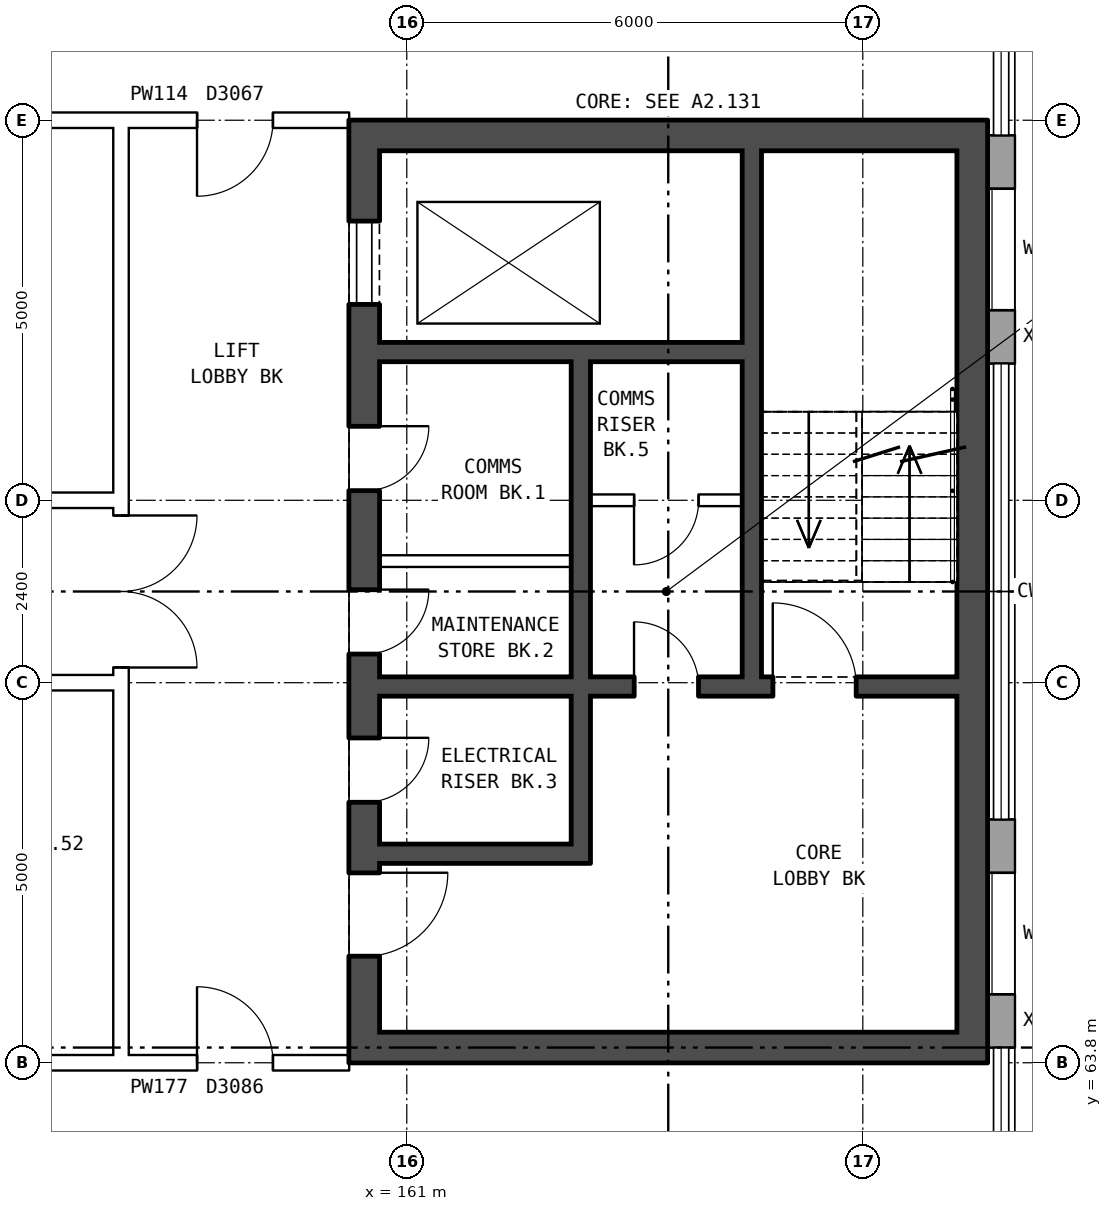
"""IFC4 building model, lengths in metres.
Left out: names, types, materials, properties, quantities, classifications, styles, units other than length and angle.
Written with IfcOpenShell. Run it as: python <this file> out.ifc"""

import sys

from ifc_helpers import new_model, si_unit, direction, frame, frame_2d, origin, place, context, subcontext, project, spatial, rectangle, extrude, element, fill, save


model = new_model("IFC4")
c1 = context("Model", 3, precision=1e-05, world=origin(), true_north=direction((0.0, 1.0)))
c2 = subcontext(c1, "Body", "Model", "MODEL_VIEW")
j1 = project(units=[si_unit("LENGTHUNIT", "METRE"), si_unit("PLANEANGLEUNIT", "RADIAN")], contexts=[c1])
p1 = place(None, origin())
s1 = spatial("IfcSite", under=j1, at=p1, CompositionType="ELEMENT")
p2 = place(p1, origin())
s2 = spatial("IfcBuilding", under=s1, at=p2, CompositionType="ELEMENT")
p3 = place(p2, frame((0.0, 0.0, 215.2)))
s3 = spatial("IfcBuildingStorey", under=s2, at=p3, CompositionType="ELEMENT", Elevation=215.2)
p4 = place(p3, frame((168.82, 64.0, 0.0), z_axis=(0.0, 0.0, 1.0), x_axis=(0.0, 1.0, 0.0)))
e1 = element("IfcWall", 1, at=p4, inside=s3, PredefinedType="STANDARD", context=c2, shape_type="SweptSolid", body=[
    extrude(rectangle(XDim=3.0, YDim=0.36, at=frame_2d((1.5, 0.0))), origin(), (0.0, 0.0, 1.0), 5.6),
])
p5 = place(p4, frame((0.7, 0.0, 3.4)))
e2 = element("IfcOpeningElement", 2, at=p5, cuts=e1, PredefinedType="OPENING", context=c2, shape_type="SweptSolid", body=[
    extrude(rectangle(XDim=1.6, YDim=1.2, at=frame_2d((0.8, 0.6))), frame((0.0, 0.19, 0.0), z_axis=(0.0, -1.0, 0.0), x_axis=(1.0, 0.0, 0.0)), (0.0, 0.0, 1.0), 0.38),
])
p6 = place(p3, frame((168.82, 73.0, 0.0), z_axis=(0.0, 0.0, 1.0), x_axis=(0.0, 1.0, 0.0)))
e3 = element("IfcWall", 3, at=p6, inside=s3, PredefinedType="STANDARD", context=c2, shape_type="SweptSolid", body=[
    extrude(rectangle(XDim=3.0, YDim=0.36, at=frame_2d((1.5, 0.0))), origin(), (0.0, 0.0, 1.0), 5.6),
])
p7 = place(p6, frame((0.7, 0.0, 3.4)))
e4 = element("IfcOpeningElement", 4, at=p7, cuts=e3, PredefinedType="OPENING", context=c2, shape_type="SweptSolid", body=[
    extrude(rectangle(XDim=1.6, YDim=1.2, at=frame_2d((0.8, 0.6))), frame((0.0, 0.19, 0.0), z_axis=(0.0, -1.0, 0.0), x_axis=(1.0, 0.0, 0.0)), (0.0, 0.0, 1.0), 0.38),
])
p8 = place(p3, frame((160.44, 76.2, 0.0), z_axis=(0.0, 0.0, 1.0), x_axis=(0.0, -1.0, 0.0)))
e5 = element("IfcWall", 5, at=p8, inside=s3, PredefinedType="SHEAR", context=c2, shape_type="SweptSolid", body=[
    extrude(rectangle(XDim=12.4, YDim=0.4, at=frame_2d((6.2, 0.0))), origin(), (0.0, 0.0, 1.0), 5.6),
])
p9 = place(p8, frame((1.325, 0.0, 0.0)))
e6 = element("IfcOpeningElement", 6, at=p9, cuts=e5, PredefinedType="OPENING", context=c2, shape_type="SweptSolid", body=[
    extrude(rectangle(XDim=1.1, YDim=2.1, at=frame_2d((0.55, 1.05))), frame((0.0, 0.21, 0.0), z_axis=(0.0, -1.0, 0.0), x_axis=(1.0, 0.0, 0.0)), (0.0, 0.0, 1.0), 0.42),
])
p10 = place(p8, frame((4.025, 0.0, 0.0)))
e7 = element("IfcOpeningElement", 7, at=p10, cuts=e5, PredefinedType="OPENING", context=c2, shape_type="SweptSolid", body=[
    extrude(rectangle(XDim=0.85, YDim=2.1, at=frame_2d((0.425, 1.05))), frame((0.0, 0.21, 0.0), z_axis=(0.0, -1.0, 0.0), x_axis=(1.0, 0.0, 0.0)), (0.0, 0.0, 1.0), 0.42),
])
p11 = place(p8, frame((6.175, 0.0, 0.0)))
e8 = element("IfcOpeningElement", 8, at=p11, cuts=e5, PredefinedType="OPENING", context=c2, shape_type="SweptSolid", body=[
    extrude(rectangle(XDim=0.85, YDim=2.1, at=frame_2d((0.425, 1.05))), frame((0.0, 0.21, 0.0), z_axis=(0.0, -1.0, 0.0), x_axis=(1.0, 0.0, 0.0)), (0.0, 0.0, 1.0), 0.42),
])
p12 = place(p8, frame((9.9, 0.0, 0.0)))
e9 = element("IfcOpeningElement", 9, at=p12, cuts=e5, PredefinedType="OPENING", context=c2, shape_type="SweptSolid", body=[
    extrude(rectangle(XDim=1.1, YDim=2.1, at=frame_2d((0.55, 1.05))), frame((0.0, 0.21, 0.0), z_axis=(0.0, -1.0, 0.0), x_axis=(1.0, 0.0, 0.0)), (0.0, 0.0, 1.0), 0.42),
])
p13 = place(p8, frame((8.125, 0.0, 0.0)))
e10 = element("IfcOpeningElement", 10, at=p13, cuts=e5, PredefinedType="OPENING", context=c2, shape_type="SweptSolid", body=[
    extrude(rectangle(XDim=0.85, YDim=2.1, at=frame_2d((0.425, 1.05))), frame((0.0, 0.21, 0.0), z_axis=(0.0, -1.0, 0.0), x_axis=(1.0, 0.0, 0.0)), (0.0, 0.0, 1.0), 0.42),
])
p14 = place(p3, frame((168.44, 76.2, 0.0), z_axis=(0.0, 0.0, 1.0), x_axis=(0.0, -1.0, 0.0)))
e11 = element("IfcWall", 11, at=p14, inside=s3, PredefinedType="SHEAR", context=c2, shape_type="SweptSolid", body=[
    extrude(rectangle(XDim=12.4, YDim=0.4, at=frame_2d((6.2, 0.0))), origin(), (0.0, 0.0, 1.0), 5.6),
])
for number, where, z_axis, x_axis in (
    (12, (160.64, 76.0, 0.0), (0.0, 0.0, 1.0), (1.0, 0.0, 0.0)),
    (13, (160.64, 64.0, 0.0), (0.0, 0.0, 1.0), (1.0, 0.0, 0.0)),
):
    element("IfcWall", number, at=place(p3, frame(where, z_axis=z_axis, x_axis=x_axis)), inside=s3, PredefinedType="SHEAR", context=c2, shape_type="SweptSolid", body=[
        extrude(rectangle(XDim=7.6, YDim=0.4, at=frame_2d((3.8, 0.0))), origin(), (0.0, 0.0, 1.0), 5.6),
    ])
p15 = place(p3, frame((160.64, 73.15, 0.0), z_axis=(0.0, 0.0, 1.0), x_axis=(1.0, 0.0, 0.0)))
e14 = element("IfcWall", 14, at=p15, inside=s3, PredefinedType="SHEAR", context=c2, shape_type="SweptSolid", body=[
    extrude(rectangle(XDim=4.775, YDim=0.25, at=frame_2d((2.388, 0.0))), origin(), (0.0, 0.0, 1.0), 5.6),
])
p16 = place(p3, frame((163.415, 71.2, 0.0), z_axis=(0.0, 0.0, 1.0), x_axis=(1.0, 0.0, 0.0)))
e15 = element("IfcWall", 15, at=p16, inside=s3, PredefinedType="PARTITIONING", context=c2, shape_type="SweptSolid", body=[
    extrude(rectangle(XDim=2.0, YDim=0.15, at=frame_2d((1.0, 0.0))), origin(), (0.0, 0.0, 1.0), 5.6),
])
p17 = place(p16, frame((0.575, 0.0, 0.0)))
e16 = element("IfcOpeningElement", 16, at=p17, cuts=e15, PredefinedType="OPENING", context=c2, shape_type="SweptSolid", body=[
    extrude(rectangle(XDim=0.85, YDim=2.1, at=frame_2d((0.425, 1.05))), frame((0.0, 0.085, 0.0), z_axis=(0.0, -1.0, 0.0), x_axis=(1.0, 0.0, 0.0)), (0.0, 0.0, 1.0), 0.17),
])
p18 = place(p3, frame((160.64, 70.4, 0.0), z_axis=(0.0, 0.0, 1.0), x_axis=(1.0, 0.0, 0.0)))
e17 = element("IfcWall", 17, at=p18, inside=s3, PredefinedType="PARTITIONING", context=c2, shape_type="SweptSolid", body=[
    extrude(rectangle(XDim=2.525, YDim=0.15, at=frame_2d((1.263, 0.0))), origin(), (0.0, 0.0, 1.0), 5.6),
])
p19 = place(p3, frame((160.64, 68.75, 0.0), z_axis=(0.0, 0.0, 1.0), x_axis=(1.0, 0.0, 0.0)))
e18 = element("IfcWall", 18, at=p19, inside=s3, PredefinedType="SHEAR", context=c2, shape_type="SweptSolid", body=[
    extrude(rectangle(XDim=7.6, YDim=0.25, at=frame_2d((3.8, 0.0))), origin(), (0.0, 0.0, 1.0), 5.6),
])
p20 = place(p19, frame((5.175, 0.0, 0.0)))
e19 = element("IfcOpeningElement", 19, at=p20, cuts=e18, PredefinedType="OPENING", context=c2, shape_type="SweptSolid", body=[
    extrude(rectangle(XDim=1.1, YDim=2.1, at=frame_2d((0.55, 1.05))), frame((0.0, 0.135, 0.0), z_axis=(0.0, -1.0, 0.0), x_axis=(1.0, 0.0, 0.0)), (0.0, 0.0, 1.0), 0.27),
])
p21 = place(p19, frame((3.35, 0.0, 0.0)))
e20 = element("IfcOpeningElement", 20, at=p21, cuts=e18, PredefinedType="OPENING", context=c2, shape_type="SweptSolid", body=[
    extrude(rectangle(XDim=0.85, YDim=2.1, at=frame_2d((0.425, 1.05))), frame((0.0, 0.135, 0.0), z_axis=(0.0, -1.0, 0.0), x_axis=(1.0, 0.0, 0.0)), (0.0, 0.0, 1.0), 0.27),
])
p22 = place(p3, frame((160.64, 66.55, 0.0), z_axis=(0.0, 0.0, 1.0), x_axis=(1.0, 0.0, 0.0)))
e21 = element("IfcWall", 21, at=p22, inside=s3, PredefinedType="SHEAR", context=c2, shape_type="SweptSolid", body=[
    extrude(rectangle(XDim=2.525, YDim=0.25, at=frame_2d((1.263, 0.0))), origin(), (0.0, 0.0, 1.0), 5.6),
])
p23 = place(p3, frame((163.29, 73.025, 0.0), z_axis=(0.0, 0.0, 1.0), x_axis=(0.0, -1.0, 0.0)))
e22 = element("IfcWall", 22, at=p23, inside=s3, PredefinedType="SHEAR", context=c2, shape_type="SweptSolid", body=[
    extrude(rectangle(XDim=4.15, YDim=0.25, at=frame_2d((2.075, 0.0))), origin(), (0.0, 0.0, 1.0), 5.6),
])
p24 = place(p3, frame((163.29, 68.625, 0.0), z_axis=(0.0, 0.0, 1.0), x_axis=(0.0, -1.0, 0.0)))
e23 = element("IfcWall", 23, at=p24, inside=s3, PredefinedType="SHEAR", context=c2, shape_type="SweptSolid", body=[
    extrude(rectangle(XDim=2.2, YDim=0.25, at=frame_2d((1.1, 0.0))), origin(), (0.0, 0.0, 1.0), 5.6),
])
p25 = place(p3, frame((165.54, 75.8, 0.0), z_axis=(0.0, 0.0, 1.0), x_axis=(0.0, -1.0, 0.0)))
e24 = element("IfcWall", 24, at=p25, inside=s3, PredefinedType="SHEAR", context=c2, shape_type="SweptSolid", body=[
    extrude(rectangle(XDim=6.925, YDim=0.25, at=frame_2d((3.462, 0.0))), origin(), (0.0, 0.0, 1.0), 5.6),
])
p26 = place(p3, frame((157.24, 63.9, 0.0), z_axis=(0.0, 0.0, 1.0), x_axis=(0.0, 1.0, 0.0)))
e25 = element("IfcWall", 25, at=p26, inside=s3, PredefinedType="PARTITIONING", context=c2, shape_type="SweptSolid", body=[
    extrude(rectangle(XDim=12.2, YDim=0.2, at=frame_2d((6.1, 0.0))), origin(), (0.0, 0.0, 1.0), 5.6),
])
p27 = place(p26, frame((5.1, 0.0, 0.0)))
e26 = element("IfcOpeningElement", 26, at=p27, cuts=e25, PredefinedType="OPENING", context=c2, shape_type="SweptSolid", body=[
    extrude(rectangle(XDim=2.0, YDim=2.1, at=frame_2d((1.0, 1.05))), frame((0.0, 0.11, 0.0), z_axis=(0.0, -1.0, 0.0), x_axis=(1.0, 0.0, 0.0)), (0.0, 0.0, 1.0), 0.22),
])
p28 = place(p3, frame((142.76, 63.8, 0.0), z_axis=(0.0, 0.0, 1.0), x_axis=(1.0, 0.0, 0.0)))
e27 = element("IfcWall", 27, at=p28, inside=s3, PredefinedType="PARTITIONING", context=c2, shape_type="SweptSolid", body=[
    extrude(rectangle(XDim=14.48, YDim=0.2, at=frame_2d((7.24, 0.0))), origin(), (0.0, 0.0, 1.0), 5.6),
])
p29 = place(p28, frame((3.12, 0.0, 0.0)))
e28 = element("IfcOpeningElement", 28, at=p29, cuts=e27, PredefinedType="OPENING", context=c2, shape_type="SweptSolid", body=[
    extrude(rectangle(XDim=1.0, YDim=2.1, at=frame_2d((0.5, 1.05))), frame((0.0, 0.11, 0.0), z_axis=(0.0, -1.0, 0.0), x_axis=(1.0, 0.0, 0.0)), (0.0, 0.0, 1.0), 0.22),
])
p30 = place(p28, frame((10.36, 0.0, 0.0)))
e29 = element("IfcOpeningElement", 29, at=p30, cuts=e27, PredefinedType="OPENING", context=c2, shape_type="SweptSolid", body=[
    extrude(rectangle(XDim=1.0, YDim=2.1, at=frame_2d((0.5, 1.05))), frame((0.0, 0.11, 0.0), z_axis=(0.0, -1.0, 0.0), x_axis=(1.0, 0.0, 0.0)), (0.0, 0.0, 1.0), 0.22),
])
p31 = place(p3, frame((157.24, 63.8, 0.0), z_axis=(0.0, 0.0, 1.0), x_axis=(1.0, 0.0, 0.0)))
e30 = element("IfcWall", 30, at=p31, inside=s3, PredefinedType="PARTITIONING", context=c2, shape_type="SweptSolid", body=[
    extrude(rectangle(XDim=3.0, YDim=0.2, at=frame_2d((1.5, 0.0))), origin(), (0.0, 0.0, 1.0), 5.6),
])
p32 = place(p31, frame((1.0, 0.0, 0.0)))
e31 = element("IfcOpeningElement", 31, at=p32, cuts=e30, PredefinedType="OPENING", context=c2, shape_type="SweptSolid", body=[
    extrude(rectangle(XDim=1.0, YDim=2.1, at=frame_2d((0.5, 1.05))), frame((0.0, 0.11, 0.0), z_axis=(0.0, -1.0, 0.0), x_axis=(1.0, 0.0, 0.0)), (0.0, 0.0, 1.0), 0.22),
])
for number, where, z_axis, x_axis in (
    (32, (142.76, 68.8, 0.0), (0.0, 0.0, 1.0), (1.0, 0.0, 0.0)),
    (33, (142.76, 71.2, 0.0), (0.0, 0.0, 1.0), (1.0, 0.0, 0.0)),
):
    element("IfcWall", number, at=place(p3, frame(where, z_axis=z_axis, x_axis=x_axis)), inside=s3, PredefinedType="PARTITIONING", context=c2, shape_type="SweptSolid", body=[
        extrude(rectangle(XDim=14.48, YDim=0.2, at=frame_2d((7.24, 0.0))), origin(), (0.0, 0.0, 1.0), 5.6),
    ])
p33 = place(p3, frame((142.76, 76.2, 0.0), z_axis=(0.0, 0.0, 1.0), x_axis=(1.0, 0.0, 0.0)))
e34 = element("IfcWall", 34, at=p33, inside=s3, PredefinedType="PARTITIONING", context=c2, shape_type="SweptSolid", body=[
    extrude(rectangle(XDim=14.48, YDim=0.2, at=frame_2d((7.24, 0.0))), origin(), (0.0, 0.0, 1.0), 5.6),
])
p34 = place(p33, frame((2.12, 0.0, 0.0)))
e35 = element("IfcOpeningElement", 35, at=p34, cuts=e34, PredefinedType="OPENING", context=c2, shape_type="SweptSolid", body=[
    extrude(rectangle(XDim=1.0, YDim=2.1, at=frame_2d((0.5, 1.05))), frame((0.0, 0.11, 0.0), z_axis=(0.0, -1.0, 0.0), x_axis=(1.0, 0.0, 0.0)), (0.0, 0.0, 1.0), 0.22),
])
p35 = place(p33, frame((9.36, 0.0, 0.0)))
e36 = element("IfcOpeningElement", 36, at=p35, cuts=e34, PredefinedType="OPENING", context=c2, shape_type="SweptSolid", body=[
    extrude(rectangle(XDim=1.0, YDim=2.1, at=frame_2d((0.5, 1.05))), frame((0.0, 0.11, 0.0), z_axis=(0.0, -1.0, 0.0), x_axis=(1.0, 0.0, 0.0)), (0.0, 0.0, 1.0), 0.22),
])
p36 = place(p3, frame((157.24, 76.2, 0.0), z_axis=(0.0, 0.0, 1.0), x_axis=(1.0, 0.0, 0.0)))
e37 = element("IfcWall", 37, at=p36, inside=s3, PredefinedType="PARTITIONING", context=c2, shape_type="SweptSolid", body=[
    extrude(rectangle(XDim=3.0, YDim=0.2, at=frame_2d((1.5, 0.0))), origin(), (0.0, 0.0, 1.0), 5.6),
])
p37 = place(p36, frame((1.0, 0.0, 0.0)))
e38 = element("IfcOpeningElement", 38, at=p37, cuts=e37, PredefinedType="OPENING", context=c2, shape_type="SweptSolid", body=[
    extrude(rectangle(XDim=1.0, YDim=2.1, at=frame_2d((0.5, 1.05))), frame((0.0, 0.11, 0.0), z_axis=(0.0, -1.0, 0.0), x_axis=(1.0, 0.0, 0.0)), (0.0, 0.0, 1.0), 0.22),
])
p38 = place(p5, origin())
e39 = element("IfcWindow", 39, at=p38, inside=s3, PartitioningType="DOUBLE_PANEL_HORIZONTAL", PredefinedType="WINDOW", context=c2, shape_type="SweptSolid", body=[
    extrude(rectangle(XDim=1.6, YDim=1.2, at=frame_2d((0.8, 0.6))), frame((0.0, 0.15, 0.0), z_axis=(0.0, -1.0, 0.0), x_axis=(1.0, 0.0, 0.0)), (0.0, 0.0, 1.0), 0.06),
])
fill(e2, e39)
p39 = place(p7, origin())
e40 = element("IfcWindow", 40, at=p39, inside=s3, PartitioningType="DOUBLE_PANEL_HORIZONTAL", PredefinedType="WINDOW", context=c2, shape_type="SweptSolid", body=[
    extrude(rectangle(XDim=1.6, YDim=1.2, at=frame_2d((0.8, 0.6))), frame((0.0, 0.15, 0.0), z_axis=(0.0, -1.0, 0.0), x_axis=(1.0, 0.0, 0.0)), (0.0, 0.0, 1.0), 0.06),
])
fill(e4, e40)
p40 = place(p9, origin())
e41 = element("IfcDoor", 41, at=p40, inside=s3, OperationType="DOUBLE_DOOR_SLIDING", PredefinedType="DOOR", context=c2, shape_type="SweptSolid", body=[
    extrude(rectangle(XDim=1.1, YDim=2.1, at=frame_2d((0.55, 1.05))), frame((0.0, 0.185, 0.0), z_axis=(0.0, -1.0, 0.0), x_axis=(1.0, 0.0, 0.0)), (0.0, 0.0, 1.0), 0.05),
])
fill(e6, e41)
p41 = place(p10, origin())
e42 = element("IfcDoor", 42, at=p41, inside=s3, OperationType="SINGLE_SWING_LEFT", PredefinedType="DOOR", context=c2, shape_type="SweptSolid", body=[
    extrude(rectangle(XDim=0.85, YDim=2.1, at=frame_2d((0.425, 1.05))), frame((0.0, 0.185, 0.0), z_axis=(0.0, -1.0, 0.0), x_axis=(1.0, 0.0, 0.0)), (0.0, 0.0, 1.0), 0.05),
])
fill(e7, e42)
p42 = place(p11, origin())
e43 = element("IfcDoor", 43, at=p42, inside=s3, OperationType="SINGLE_SWING_LEFT", PredefinedType="DOOR", context=c2, shape_type="SweptSolid", body=[
    extrude(rectangle(XDim=0.85, YDim=2.1, at=frame_2d((0.425, 1.05))), frame((0.0, 0.185, 0.0), z_axis=(0.0, -1.0, 0.0), x_axis=(1.0, 0.0, 0.0)), (0.0, 0.0, 1.0), 0.05),
])
fill(e8, e43)
p43 = place(p12, origin())
e44 = element("IfcDoor", 44, at=p43, inside=s3, OperationType="SINGLE_SWING_LEFT", PredefinedType="DOOR", context=c2, shape_type="SweptSolid", body=[
    extrude(rectangle(XDim=1.1, YDim=2.1, at=frame_2d((0.55, 1.05))), frame((0.0, 0.185, 0.0), z_axis=(0.0, -1.0, 0.0), x_axis=(1.0, 0.0, 0.0)), (0.0, 0.0, 1.0), 0.05),
])
fill(e9, e44)
p44 = place(p20, origin())
e45 = element("IfcDoor", 45, at=p44, inside=s3, OperationType="SINGLE_SWING_LEFT", PredefinedType="DOOR", context=c2, shape_type="SweptSolid", body=[
    extrude(rectangle(XDim=1.1, YDim=2.1, at=frame_2d((0.55, 1.05))), frame((0.0, 0.025, 0.0), z_axis=(0.0, -1.0, 0.0), x_axis=(1.0, 0.0, 0.0)), (0.0, 0.0, 1.0), 0.05),
])
fill(e19, e45)
p45 = place(p13, origin())
e46 = element("IfcDoor", 46, at=p45, inside=s3, OperationType="SINGLE_SWING_LEFT", PredefinedType="DOOR", context=c2, shape_type="SweptSolid", body=[
    extrude(rectangle(XDim=0.85, YDim=2.1, at=frame_2d((0.425, 1.05))), frame((0.0, 0.185, 0.0), z_axis=(0.0, -1.0, 0.0), x_axis=(1.0, 0.0, 0.0)), (0.0, 0.0, 1.0), 0.05),
])
fill(e10, e46)
p46 = place(p21, origin())
e47 = element("IfcDoor", 47, at=p46, inside=s3, OperationType="SINGLE_SWING_LEFT", PredefinedType="DOOR", context=c2, shape_type="SweptSolid", body=[
    extrude(rectangle(XDim=0.85, YDim=2.1, at=frame_2d((0.425, 1.05))), frame((0.0, 0.025, 0.0), z_axis=(0.0, -1.0, 0.0), x_axis=(1.0, 0.0, 0.0)), (0.0, 0.0, 1.0), 0.05),
])
fill(e20, e47)
p47 = place(p17, frame((0.85, 0.0, 0.0), z_axis=(0.0, 0.0, 1.0), x_axis=(-1.0, 0.0, 0.0)))
e48 = element("IfcDoor", 48, at=p47, inside=s3, OperationType="SINGLE_SWING_RIGHT", PredefinedType="DOOR", context=c2, shape_type="SweptSolid", body=[
    extrude(rectangle(XDim=0.85, YDim=2.1, at=frame_2d((0.425, 1.05))), frame((0.0, 0.025, 0.0), z_axis=(0.0, -1.0, 0.0), x_axis=(1.0, 0.0, 0.0)), (0.0, 0.0, 1.0), 0.05),
])
fill(e16, e48)
p48 = place(p27, frame((2.0, 0.0, 0.0), z_axis=(0.0, 0.0, 1.0), x_axis=(-1.0, 0.0, 0.0)))
e49 = element("IfcDoor", 49, at=p48, inside=s3, OperationType="DOUBLE_DOOR_SINGLE_SWING", PredefinedType="DOOR", context=c2, shape_type="SweptSolid", body=[
    extrude(rectangle(XDim=2.0, YDim=2.1, at=frame_2d((1.0, 1.05))), frame((0.0, 0.025, 0.0), z_axis=(0.0, -1.0, 0.0), x_axis=(1.0, 0.0, 0.0)), (0.0, 0.0, 1.0), 0.05),
])
fill(e26, e49)
p49 = place(p32, origin())
e50 = element("IfcDoor", 50, at=p49, inside=s3, OperationType="SINGLE_SWING_LEFT", PredefinedType="DOOR", context=c2, shape_type="SweptSolid", body=[
    extrude(rectangle(XDim=1.0, YDim=2.1, at=frame_2d((0.5, 1.05))), frame((0.0, 0.025, 0.0), z_axis=(0.0, -1.0, 0.0), x_axis=(1.0, 0.0, 0.0)), (0.0, 0.0, 1.0), 0.05),
])
fill(e31, e50)
p50 = place(p37, frame((1.0, 0.0, 0.0), z_axis=(0.0, 0.0, 1.0), x_axis=(-1.0, 0.0, 0.0)))
e51 = element("IfcDoor", 51, at=p50, inside=s3, OperationType="SINGLE_SWING_RIGHT", PredefinedType="DOOR", context=c2, shape_type="SweptSolid", body=[
    extrude(rectangle(XDim=1.0, YDim=2.1, at=frame_2d((0.5, 1.05))), frame((0.0, 0.025, 0.0), z_axis=(0.0, -1.0, 0.0), x_axis=(1.0, 0.0, 0.0)), (0.0, 0.0, 1.0), 0.05),
])
fill(e38, e51)
save(model, sys.argv[1])
